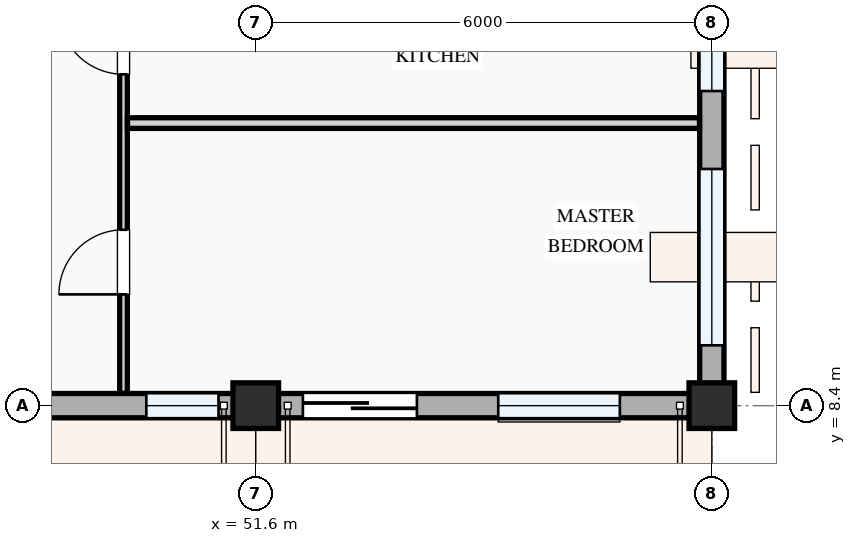
"""IFC4 building model, lengths in metres.
Left out: names, types, materials, properties, quantities, classifications, styles, units other than length and angle.
Written with IfcOpenShell. Run it as: python <this file> out.ifc"""

import sys

from ifc_helpers import new_model, si_unit, direction, frame, frame_2d, origin, origin_2d, place, context, subcontext, project, spatial, rectangle, extrude, element, fill, save


model = new_model("IFC4")
c1 = context("Model", 3, precision=1e-05, world=origin(), true_north=direction((0.0, 1.0)))
c2 = subcontext(c1, "Body", "Model", "MODEL_VIEW")
j1 = project(units=[si_unit("LENGTHUNIT", "METRE"), si_unit("PLANEANGLEUNIT", "RADIAN")], contexts=[c1])
p1 = place(None, origin())
s1 = spatial("IfcSite", under=j1, at=p1, CompositionType="ELEMENT")
p2 = place(p1, origin())
s2 = spatial("IfcBuilding", under=s1, at=p2, CompositionType="ELEMENT")
p3 = place(p2, frame((0.0, 0.0, 14.7)))
s3 = spatial("IfcBuildingStorey", under=s2, at=p3, CompositionType="ELEMENT", Elevation=14.7)
for number, where, z_axis, x_axis in (
    (1, (51.6, 8.4, 0.0), (0.0, 0.0, 1.0), (1.0, 0.0, 0.0)),
    (2, (57.6, 8.4, 0.0), (0.0, 0.0, 1.0), (1.0, 0.0, 0.0)),
):
    element("IfcColumn", number, at=place(p3, frame(where, z_axis=z_axis, x_axis=x_axis)), inside=s3, PredefinedType="COLUMN", context=c2, shape_type="SweptSolid", body=[
        extrude(rectangle(XDim=0.6, YDim=0.6, at=origin_2d()), origin(), (0.0, 0.0, 1.0), 3.3),
    ])
p4 = place(p3, frame((43.2, 8.4, 0.0), z_axis=(0.0, 0.0, 1.0), x_axis=(1.0, 0.0, 0.0)))
e3 = element("IfcWall", 3, at=p4, inside=s3, PredefinedType="STANDARD", context=c2, shape_type="SweptSolid", body=[
    extrude(rectangle(XDim=8.4, YDim=0.32, at=frame_2d((4.2, 0.0))), origin(), (0.0, 0.0, 1.0), 2.375),
])
p5 = place(p4, frame((2.11, 0.0, 0.0)))
e4 = element("IfcOpeningElement", 4, at=p5, cuts=e3, PredefinedType="OPENING", context=c2, shape_type="SweptSolid", body=[
    extrude(rectangle(XDim=1.4, YDim=2.2, at=frame_2d((0.7, 1.1))), frame((0.0, 0.17, 0.0), z_axis=(0.0, -1.0, 0.0), x_axis=(1.0, 0.0, 0.0)), (0.0, 0.0, 1.0), 0.34),
])
p6 = place(p4, frame((0.535, 0.0, 0.78)))
e5 = element("IfcOpeningElement", 5, at=p6, cuts=e3, PredefinedType="OPENING", context=c2, shape_type="SweptSolid", body=[
    extrude(rectangle(XDim=0.9, YDim=1.2, at=frame_2d((0.45, 0.6))), frame((0.0, 0.17, 0.0), z_axis=(0.0, -1.0, 0.0), x_axis=(1.0, 0.0, 0.0)), (0.0, 0.0, 1.0), 0.34),
])
p7 = place(p4, frame((4.56, 0.0, 0.78)))
e6 = element("IfcOpeningElement", 6, at=p7, cuts=e3, PredefinedType="OPENING", context=c2, shape_type="SweptSolid", body=[
    extrude(rectangle(XDim=1.1, YDim=1.3, at=frame_2d((0.55, 0.65))), frame((0.0, 0.17, 0.0), z_axis=(0.0, -1.0, 0.0), x_axis=(1.0, 0.0, 0.0)), (0.0, 0.0, 1.0), 0.34),
])
p8 = place(p4, frame((6.96, 0.0, 0.78)))
e7 = element("IfcOpeningElement", 7, at=p8, cuts=e3, PredefinedType="OPENING", context=c2, shape_type="SweptSolid", body=[
    extrude(rectangle(XDim=0.95, YDim=1.15, at=frame_2d((0.475, 0.575))), frame((0.0, 0.17, 0.0), z_axis=(0.0, -1.0, 0.0), x_axis=(1.0, 0.0, 0.0)), (0.0, 0.0, 1.0), 0.34),
])
p9 = place(p3, frame((51.6, 8.4, 0.0), z_axis=(0.0, 0.0, 1.0), x_axis=(1.0, 0.0, 0.0)))
e8 = element("IfcWall", 8, at=p9, inside=s3, PredefinedType="STANDARD", context=c2, shape_type="SweptSolid", body=[
    extrude(rectangle(XDim=6.0, YDim=0.32, at=frame_2d((3.0, 0.0))), origin(), (0.0, 0.0, 1.0), 2.475),
])
p10 = place(p9, frame((0.62, 0.0, 0.0)))
e9 = element("IfcOpeningElement", 9, at=p10, cuts=e8, PredefinedType="OPENING", context=c2, shape_type="SweptSolid", body=[
    extrude(rectangle(XDim=1.5, YDim=2.2, at=frame_2d((0.75, 1.1))), frame((0.0, 0.17, 0.0), z_axis=(0.0, -1.0, 0.0), x_axis=(1.0, 0.0, 0.0)), (0.0, 0.0, 1.0), 0.34),
])
p11 = place(p9, frame((3.19, 0.0, 0.78)))
e10 = element("IfcOpeningElement", 10, at=p11, cuts=e8, PredefinedType="OPENING", context=c2, shape_type="SweptSolid", body=[
    extrude(rectangle(XDim=1.6, YDim=1.55, at=frame_2d((0.8, 0.775))), frame((0.0, 0.17, 0.0), z_axis=(0.0, -1.0, 0.0), x_axis=(1.0, 0.0, 0.0)), (0.0, 0.0, 1.0), 0.34),
])
p12 = place(p3, frame((57.6, 8.4, 0.0), z_axis=(0.0, 0.0, 1.0), x_axis=(0.0, 1.0, 0.0)))
e11 = element("IfcWall", 11, at=p12, inside=s3, PredefinedType="STANDARD", context=c2, shape_type="SweptSolid", body=[
    extrude(rectangle(XDim=6.0, YDim=0.32, at=frame_2d((3.0, 0.0))), origin(), (0.0, 0.0, 1.0), 2.575),
])
p13 = place(p12, frame((0.794, 0.0, 0.78)))
e12 = element("IfcOpeningElement", 12, at=p13, cuts=e11, PredefinedType="OPENING", context=c2, shape_type="SweptSolid", body=[
    extrude(rectangle(XDim=2.32, YDim=1.5, at=frame_2d((1.16, 0.75))), frame((0.0, 0.17, 0.0), z_axis=(0.0, -1.0, 0.0), x_axis=(1.0, 0.0, 0.0)), (0.0, 0.0, 1.0), 0.34),
])
p14 = place(p12, frame((4.139, 0.0, 0.78)))
e13 = element("IfcOpeningElement", 13, at=p14, cuts=e11, PredefinedType="OPENING", context=c2, shape_type="SweptSolid", body=[
    extrude(rectangle(XDim=1.25, YDim=1.3, at=frame_2d((0.625, 0.65))), frame((0.0, 0.17, 0.0), z_axis=(0.0, -1.0, 0.0), x_axis=(1.0, 0.0, 0.0)), (0.0, 0.0, 1.0), 0.34),
])
p15 = place(p3, frame((49.86, 8.562, 0.0), z_axis=(0.0, 0.0, 1.0), x_axis=(0.0, 1.0, 0.0)))
e14 = element("IfcWall", 14, at=p15, inside=s3, PredefinedType="PARTITIONING", context=c2, shape_type="SweptSolid", body=[
    extrude(rectangle(XDim=7.441, YDim=0.1, at=frame_2d((3.72, 0.0))), origin(), (0.0, 0.0, 1.0), 3.0),
])
p16 = place(p15, frame((1.302, 0.0, 0.0)))
e15 = element("IfcOpeningElement", 15, at=p16, cuts=e14, PredefinedType="OPENING", context=c2, shape_type="SweptSolid", body=[
    extrude(rectangle(XDim=0.85, YDim=2.1, at=frame_2d((0.425, 1.05))), frame((0.0, 0.06, 0.0), z_axis=(0.0, -1.0, 0.0), x_axis=(1.0, 0.0, 0.0)), (0.0, 0.0, 1.0), 0.12),
])
p17 = place(p15, frame((4.198, 0.0, 0.0)))
e16 = element("IfcOpeningElement", 16, at=p17, cuts=e14, PredefinedType="OPENING", context=c2, shape_type="SweptSolid", body=[
    extrude(rectangle(XDim=0.85, YDim=2.1, at=frame_2d((0.425, 1.05))), frame((0.0, 0.06, 0.0), z_axis=(0.0, -1.0, 0.0), x_axis=(1.0, 0.0, 0.0)), (0.0, 0.0, 1.0), 0.12),
])
p18 = place(p15, frame((6.204, 0.0, 0.0)))
e17 = element("IfcOpeningElement", 17, at=p18, cuts=e14, PredefinedType="OPENING", context=c2, shape_type="SweptSolid", body=[
    extrude(rectangle(XDim=0.8, YDim=2.1, at=frame_2d((0.4, 1.05))), frame((0.0, 0.06, 0.0), z_axis=(0.0, -1.0, 0.0), x_axis=(1.0, 0.0, 0.0)), (0.0, 0.0, 1.0), 0.12),
])
p19 = place(p3, frame((49.912, 12.118, 0.0), z_axis=(0.0, 0.0, 1.0), x_axis=(1.0, 0.0, 0.0)))
e18 = element("IfcWall", 18, at=p19, inside=s3, PredefinedType="PARTITIONING", context=c2, shape_type="SweptSolid", body=[
    extrude(rectangle(XDim=7.526, YDim=0.14, at=frame_2d((3.763, 0.0))), origin(), (0.0, 0.0, 1.0), 3.0),
])
p20 = place(p8, origin())
e19 = element("IfcWindow", 19, at=p20, inside=s3, PartitioningType="SINGLE_PANEL", PredefinedType="WINDOW", context=c2, shape_type="SweptSolid", body=[
    extrude(rectangle(XDim=0.95, YDim=1.15, at=frame_2d((0.475, 0.575))), frame((0.0, 0.03, 0.0), z_axis=(0.0, -1.0, 0.0), x_axis=(1.0, 0.0, 0.0)), (0.0, 0.0, 1.0), 0.06),
])
fill(e7, e19)
p21 = place(p10, frame((1.5, 0.0, 0.0), z_axis=(0.0, 0.0, 1.0), x_axis=(-1.0, 0.0, 0.0)))
e20 = element("IfcDoor", 20, at=p21, inside=s3, OperationType="SLIDING_TO_RIGHT", PredefinedType="DOOR", context=c2, shape_type="SweptSolid", body=[
    extrude(rectangle(XDim=1.5, YDim=2.2, at=frame_2d((0.75, 1.1))), frame((0.0, 0.025, 0.0), z_axis=(0.0, -1.0, 0.0), x_axis=(1.0, 0.0, 0.0)), (0.0, 0.0, 1.0), 0.05),
])
fill(e9, e20)
p22 = place(p11, origin())
e21 = element("IfcWindow", 21, at=p22, inside=s3, PartitioningType="DOUBLE_PANEL_VERTICAL", PredefinedType="WINDOW", context=c2, shape_type="SweptSolid", body=[
    extrude(rectangle(XDim=1.6, YDim=1.55, at=frame_2d((0.8, 0.775))), frame((0.0, 0.03, 0.0), z_axis=(0.0, -1.0, 0.0), x_axis=(1.0, 0.0, 0.0)), (0.0, 0.0, 1.0), 0.06),
])
fill(e10, e21)
p23 = place(p13, origin())
e22 = element("IfcWindow", 22, at=p23, inside=s3, PartitioningType="DOUBLE_PANEL_VERTICAL", PredefinedType="WINDOW", context=c2, shape_type="SweptSolid", body=[
    extrude(rectangle(XDim=2.32, YDim=1.5, at=frame_2d((1.16, 0.75))), frame((0.0, 0.03, 0.0), z_axis=(0.0, -1.0, 0.0), x_axis=(1.0, 0.0, 0.0)), (0.0, 0.0, 1.0), 0.06),
])
fill(e12, e22)
p24 = place(p14, origin())
e23 = element("IfcWindow", 23, at=p24, inside=s3, PartitioningType="SINGLE_PANEL", PredefinedType="WINDOW", context=c2, shape_type="SweptSolid", body=[
    extrude(rectangle(XDim=1.25, YDim=1.3, at=frame_2d((0.625, 0.65))), frame((0.0, 0.03, 0.0), z_axis=(0.0, -1.0, 0.0), x_axis=(1.0, 0.0, 0.0)), (0.0, 0.0, 1.0), 0.06),
])
fill(e13, e23)
p25 = place(p16, origin())
e24 = element("IfcDoor", 24, at=p25, inside=s3, OperationType="SINGLE_SWING_LEFT", PredefinedType="DOOR", context=c2, shape_type="SweptSolid", body=[
    extrude(rectangle(XDim=0.85, YDim=2.1, at=frame_2d((0.425, 1.05))), frame((0.0, 0.025, 0.0), z_axis=(0.0, -1.0, 0.0), x_axis=(1.0, 0.0, 0.0)), (0.0, 0.0, 1.0), 0.05),
])
fill(e15, e24)
p26 = place(p17, origin())
e25 = element("IfcDoor", 25, at=p26, inside=s3, OperationType="SINGLE_SWING_RIGHT", PredefinedType="DOOR", context=c2, shape_type="SweptSolid", body=[
    extrude(rectangle(XDim=0.85, YDim=2.1, at=frame_2d((0.425, 1.05))), frame((0.0, 0.025, 0.0), z_axis=(0.0, -1.0, 0.0), x_axis=(1.0, 0.0, 0.0)), (0.0, 0.0, 1.0), 0.05),
])
fill(e16, e25)
save(model, sys.argv[1])
